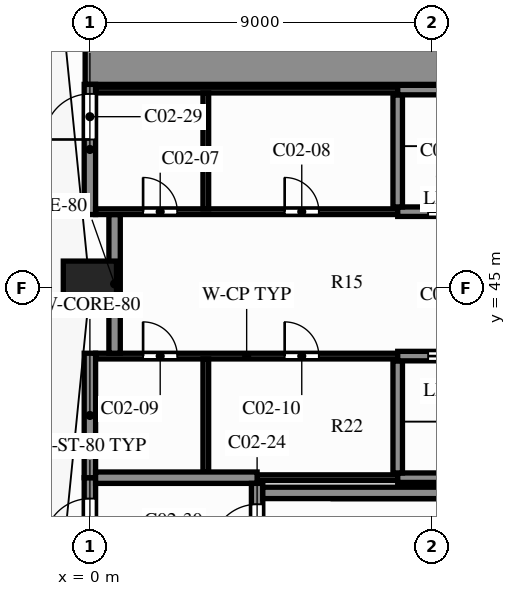
"""IFC4 building model, lengths in metres.
Left out: names, types, materials, properties, quantities, classifications, styles, units other than length and angle.
Written with IfcOpenShell. Run it as: python <this file> out.ifc"""

import sys

from ifc_helpers import new_model, si_unit, direction, frame, frame_2d, origin, origin_2d, place, context, subcontext, project, spatial, rectangle, extrude, element, fill, save


model = new_model("IFC4")
c1 = context("Model", 3, precision=1e-05, world=origin(), true_north=direction((0.0, 1.0)))
c2 = subcontext(c1, "Body", "Model", "MODEL_VIEW")
j1 = project(units=[si_unit("LENGTHUNIT", "METRE"), si_unit("PLANEANGLEUNIT", "RADIAN")], contexts=[c1])
p1 = place(None, origin())
s1 = spatial("IfcSite", under=j1, at=p1, CompositionType="ELEMENT")
p2 = place(p1, origin())
s2 = spatial("IfcBuilding", under=s1, at=p2, CompositionType="ELEMENT")
p3 = place(p2, origin())
s3 = spatial("IfcBuildingStorey", under=s2, at=p3, CompositionType="ELEMENT", Elevation=0.0)
p4 = place(p3, frame((0.0, 45.0, 0.0), z_axis=(0.0, 0.0, 1.0), x_axis=(1.0, 0.0, 0.0)))
e1 = element("IfcColumn", 1, at=p4, inside=s3, PredefinedType="COLUMN", context=c2, shape_type="SweptSolid", body=[
    extrude(rectangle(XDim=1.4, YDim=1.4, at=origin_2d()), origin(), (0.0, 0.0, 1.0), 7.5),
])
p5 = place(p3, frame((4.55, 39.6, 0.0), z_axis=(0.0, 0.0, 1.0), x_axis=(1.0, 0.0, 0.0)))
e2 = element("IfcWall", 2, at=p5, inside=s3, PredefinedType="SHEAR", context=c2, shape_type="SweptSolid", body=[
    extrude(rectangle(XDim=7.7, YDim=0.3, at=frame_2d((3.85, 0.0))), origin(), (0.0, 0.0, 1.0), 7.2),
])
p6 = place(p3, frame((4.4, 40.0, 0.0), z_axis=(0.0, 0.0, 1.0), x_axis=(1.0, 0.0, 0.0)))
e3 = element("IfcWall", 3, at=p6, inside=s3, PredefinedType="PARTITIONING", context=c2, shape_type="SweptSolid", body=[
    extrude(rectangle(XDim=3.7, YDim=0.15, at=frame_2d((1.85, 0.0))), origin(), (0.0, 0.0, 1.0), 7.2),
])
p7 = place(p3, frame((8.1, 40.0, 0.0), z_axis=(0.0, 0.0, 1.0), x_axis=(1.0, 0.0, 0.0)))
e4 = element("IfcWall", 4, at=p7, inside=s3, PredefinedType="SHEAR", context=c2, shape_type="SweptSolid", body=[
    extrude(rectangle(XDim=16.075, YDim=0.25, at=frame_2d((8.038, 0.0))), origin(), (0.0, 0.0, 1.0), 7.2),
])
p8 = place(p3, frame((0.15, 40.0, 0.0), z_axis=(0.0, 0.0, 1.0), x_axis=(1.0, 0.0, 0.0)))
e5 = element("IfcWall", 5, at=p8, inside=s3, PredefinedType="SHEAR", context=c2, shape_type="SweptSolid", body=[
    extrude(rectangle(XDim=4.25, YDim=0.3, at=frame_2d((2.125, 0.0))), origin(), (0.0, 0.0, 1.0), 7.2),
])
p9 = place(p3, frame((0.15, 43.2, 0.0), z_axis=(0.0, 0.0, 1.0), x_axis=(1.0, 0.0, 0.0)))
e6 = element("IfcWall", 6, at=p9, inside=s3, PredefinedType="PARTITIONING", context=c2, shape_type="SweptSolid", body=[
    extrude(rectangle(XDim=7.95, YDim=0.15, at=frame_2d((3.975, 0.0))), origin(), (0.0, 0.0, 1.0), 7.2),
])
p10 = place(p9, frame((1.25, 0.0, 0.0)))
e7 = element("IfcOpeningElement", 7, at=p10, cuts=e6, PredefinedType="OPENING", context=c2, shape_type="SweptSolid", body=[
    extrude(rectangle(XDim=0.9, YDim=2.1, at=frame_2d((0.45, 1.05))), frame((0.0, 0.085, 0.0), z_axis=(0.0, -1.0, 0.0), x_axis=(1.0, 0.0, 0.0)), (0.0, 0.0, 1.0), 0.17),
])
p11 = place(p9, frame((4.975, 0.0, 0.0)))
e8 = element("IfcOpeningElement", 8, at=p11, cuts=e6, PredefinedType="OPENING", context=c2, shape_type="SweptSolid", body=[
    extrude(rectangle(XDim=0.9, YDim=2.1, at=frame_2d((0.45, 1.05))), frame((0.0, 0.085, 0.0), z_axis=(0.0, -1.0, 0.0), x_axis=(1.0, 0.0, 0.0)), (0.0, 0.0, 1.0), 0.17),
])
p12 = place(p3, frame((8.1, 43.2, 0.0), z_axis=(0.0, 0.0, 1.0), x_axis=(1.0, 0.0, 0.0)))
e9 = element("IfcWall", 9, at=p12, inside=s3, PredefinedType="SHEAR", context=c2, shape_type="SweptSolid", body=[
    extrude(rectangle(XDim=16.075, YDim=0.25, at=frame_2d((8.038, 0.0))), origin(), (0.0, 0.0, 1.0), 7.2),
])
p13 = place(p12, frame((14.3, 0.0, 0.0)))
e10 = element("IfcOpeningElement", 10, at=p13, cuts=e9, PredefinedType="OPENING", context=c2, shape_type="SweptSolid", body=[
    extrude(rectangle(XDim=1.1, YDim=2.1, at=frame_2d((0.55, 1.05))), frame((0.0, 0.135, 0.0), z_axis=(0.0, -1.0, 0.0), x_axis=(1.0, 0.0, 0.0)), (0.0, 0.0, 1.0), 0.27),
])
p14 = place(p12, frame((0.8, 0.0, 0.0)))
e11 = element("IfcOpeningElement", 11, at=p14, cuts=e9, PredefinedType="OPENING", context=c2, shape_type="SweptSolid", body=[
    extrude(rectangle(XDim=1.1, YDim=2.1, at=frame_2d((0.55, 1.05))), frame((0.0, 0.135, 0.0), z_axis=(0.0, -1.0, 0.0), x_axis=(1.0, 0.0, 0.0)), (0.0, 0.0, 1.0), 0.27),
])
p15 = place(p12, frame((3.5, 0.0, 0.0)))
e12 = element("IfcOpeningElement", 12, at=p15, cuts=e9, PredefinedType="OPENING", context=c2, shape_type="SweptSolid", body=[
    extrude(rectangle(XDim=1.1, YDim=2.1, at=frame_2d((0.55, 1.05))), frame((0.0, 0.135, 0.0), z_axis=(0.0, -1.0, 0.0), x_axis=(1.0, 0.0, 0.0)), (0.0, 0.0, 1.0), 0.27),
])
p16 = place(p12, frame((6.2, 0.0, 0.0)))
e13 = element("IfcOpeningElement", 13, at=p16, cuts=e9, PredefinedType="OPENING", context=c2, shape_type="SweptSolid", body=[
    extrude(rectangle(XDim=1.1, YDim=2.1, at=frame_2d((0.55, 1.05))), frame((0.0, 0.135, 0.0), z_axis=(0.0, -1.0, 0.0), x_axis=(1.0, 0.0, 0.0)), (0.0, 0.0, 1.0), 0.27),
])
p17 = place(p12, frame((8.9, 0.0, 0.0)))
e14 = element("IfcOpeningElement", 14, at=p17, cuts=e9, PredefinedType="OPENING", context=c2, shape_type="SweptSolid", body=[
    extrude(rectangle(XDim=1.1, YDim=2.1, at=frame_2d((0.55, 1.05))), frame((0.0, 0.135, 0.0), z_axis=(0.0, -1.0, 0.0), x_axis=(1.0, 0.0, 0.0)), (0.0, 0.0, 1.0), 0.27),
])
p18 = place(p12, frame((11.6, 0.0, 0.0)))
e15 = element("IfcOpeningElement", 15, at=p18, cuts=e9, PredefinedType="OPENING", context=c2, shape_type="SweptSolid", body=[
    extrude(rectangle(XDim=1.1, YDim=2.1, at=frame_2d((0.55, 1.05))), frame((0.0, 0.135, 0.0), z_axis=(0.0, -1.0, 0.0), x_axis=(1.0, 0.0, 0.0)), (0.0, 0.0, 1.0), 0.27),
])
p19 = place(p3, frame((0.15, 47.0, 0.0), z_axis=(0.0, 0.0, 1.0), x_axis=(1.0, 0.0, 0.0)))
e16 = element("IfcWall", 16, at=p19, inside=s3, PredefinedType="PARTITIONING", context=c2, shape_type="SweptSolid", body=[
    extrude(rectangle(XDim=7.95, YDim=0.15, at=frame_2d((3.975, 0.0))), origin(), (0.0, 0.0, 1.0), 7.2),
])
p20 = place(p19, frame((1.25, 0.0, 0.0)))
e17 = element("IfcOpeningElement", 17, at=p20, cuts=e16, PredefinedType="OPENING", context=c2, shape_type="SweptSolid", body=[
    extrude(rectangle(XDim=0.9, YDim=2.1, at=frame_2d((0.45, 1.05))), frame((0.0, 0.085, 0.0), z_axis=(0.0, -1.0, 0.0), x_axis=(1.0, 0.0, 0.0)), (0.0, 0.0, 1.0), 0.17),
])
p21 = place(p19, frame((4.975, 0.0, 0.0)))
e18 = element("IfcOpeningElement", 18, at=p21, cuts=e16, PredefinedType="OPENING", context=c2, shape_type="SweptSolid", body=[
    extrude(rectangle(XDim=0.9, YDim=2.1, at=frame_2d((0.45, 1.05))), frame((0.0, 0.085, 0.0), z_axis=(0.0, -1.0, 0.0), x_axis=(1.0, 0.0, 0.0)), (0.0, 0.0, 1.0), 0.17),
])
p22 = place(p3, frame((8.1, 47.0, 0.0), z_axis=(0.0, 0.0, 1.0), x_axis=(1.0, 0.0, 0.0)))
e19 = element("IfcWall", 19, at=p22, inside=s3, PredefinedType="SHEAR", context=c2, shape_type="SweptSolid", body=[
    extrude(rectangle(XDim=13.5, YDim=0.25, at=frame_2d((6.75, 0.0))), origin(), (0.0, 0.0, 1.0), 7.2),
])
p23 = place(p22, frame((0.8, 0.0, 0.0)))
e20 = element("IfcOpeningElement", 20, at=p23, cuts=e19, PredefinedType="OPENING", context=c2, shape_type="SweptSolid", body=[
    extrude(rectangle(XDim=1.1, YDim=2.1, at=frame_2d((0.55, 1.05))), frame((0.0, 0.135, 0.0), z_axis=(0.0, -1.0, 0.0), x_axis=(1.0, 0.0, 0.0)), (0.0, 0.0, 1.0), 0.27),
])
p24 = place(p22, frame((3.5, 0.0, 0.0)))
e21 = element("IfcOpeningElement", 21, at=p24, cuts=e19, PredefinedType="OPENING", context=c2, shape_type="SweptSolid", body=[
    extrude(rectangle(XDim=1.1, YDim=2.1, at=frame_2d((0.55, 1.05))), frame((0.0, 0.135, 0.0), z_axis=(0.0, -1.0, 0.0), x_axis=(1.0, 0.0, 0.0)), (0.0, 0.0, 1.0), 0.27),
])
p25 = place(p22, frame((6.2, 0.0, 0.0)))
e22 = element("IfcOpeningElement", 22, at=p25, cuts=e19, PredefinedType="OPENING", context=c2, shape_type="SweptSolid", body=[
    extrude(rectangle(XDim=1.1, YDim=2.1, at=frame_2d((0.55, 1.05))), frame((0.0, 0.135, 0.0), z_axis=(0.0, -1.0, 0.0), x_axis=(1.0, 0.0, 0.0)), (0.0, 0.0, 1.0), 0.27),
])
p26 = place(p22, frame((8.9, 0.0, 0.0)))
e23 = element("IfcOpeningElement", 23, at=p26, cuts=e19, PredefinedType="OPENING", context=c2, shape_type="SweptSolid", body=[
    extrude(rectangle(XDim=1.1, YDim=2.1, at=frame_2d((0.55, 1.05))), frame((0.0, 0.135, 0.0), z_axis=(0.0, -1.0, 0.0), x_axis=(1.0, 0.0, 0.0)), (0.0, 0.0, 1.0), 0.27),
])
p27 = place(p22, frame((11.6, 0.0, 0.0)))
e24 = element("IfcOpeningElement", 24, at=p27, cuts=e19, PredefinedType="OPENING", context=c2, shape_type="SweptSolid", body=[
    extrude(rectangle(XDim=1.1, YDim=2.1, at=frame_2d((0.55, 1.05))), frame((0.0, 0.135, 0.0), z_axis=(0.0, -1.0, 0.0), x_axis=(1.0, 0.0, 0.0)), (0.0, 0.0, 1.0), 0.27),
])
p28 = place(p3, frame((0.15, 50.2, 0.0), z_axis=(0.0, 0.0, 1.0), x_axis=(1.0, 0.0, 0.0)))
e25 = element("IfcWall", 25, at=p28, inside=s3, PredefinedType="PARTITIONING", context=c2, shape_type="SweptSolid", body=[
    extrude(rectangle(XDim=7.95, YDim=0.15, at=frame_2d((3.975, 0.0))), origin(), (0.0, 0.0, 1.0), 7.2),
])
p29 = place(p3, frame((8.1, 50.2, 0.0), z_axis=(0.0, 0.0, 1.0), x_axis=(1.0, 0.0, 0.0)))
e26 = element("IfcWall", 26, at=p29, inside=s3, PredefinedType="SHEAR", context=c2, shape_type="SweptSolid", body=[
    extrude(rectangle(XDim=13.375, YDim=0.25, at=frame_2d((6.688, 0.0))), origin(), (0.0, 0.0, 1.0), 7.2),
])
p30 = place(p3, frame((-0.125, 51.0, 0.0), z_axis=(0.0, 0.0, 1.0), x_axis=(1.0, 0.0, 0.0)))
e27 = element("IfcWall", 27, at=p30, inside=s3, PredefinedType="SHEAR", context=c2, shape_type="SweptSolid", body=[
    extrude(rectangle(XDim=21.625, YDim=1.3, at=frame_2d((10.812, 0.0))), origin(), (0.0, 0.0, 1.0), 7.2),
])
p31 = place(p3, frame((0.0, 40.0, 0.0), z_axis=(0.0, 0.0, 1.0), x_axis=(0.0, 1.0, 0.0)))
e28 = element("IfcWall", 28, at=p31, inside=s3, PredefinedType="SHEAR", context=c2, shape_type="SweptSolid", body=[
    extrude(rectangle(XDim=3.275, YDim=0.3, at=frame_2d((1.637, 0.0))), origin(), (0.0, 0.0, 1.0), 7.2),
])
p32 = place(p3, frame((0.0, 46.925, 0.0), z_axis=(0.0, 0.0, 1.0), x_axis=(0.0, 1.0, 0.0)))
e29 = element("IfcWall", 29, at=p32, inside=s3, PredefinedType="SHEAR", context=c2, shape_type="SweptSolid", body=[
    extrude(rectangle(XDim=3.425, YDim=0.3, at=frame_2d((1.712, 0.0))), origin(), (0.0, 0.0, 1.0), 7.2),
])
p33 = place(p32, frame((1.975, 0.0, 0.0)))
e30 = element("IfcOpeningElement", 30, at=p33, cuts=e29, PredefinedType="OPENING", context=c2, shape_type="SweptSolid", body=[
    extrude(rectangle(XDim=1.2, YDim=2.1, at=frame_2d((0.6, 1.05))), frame((0.0, 0.16, 0.0), z_axis=(0.0, -1.0, 0.0), x_axis=(1.0, 0.0, 0.0)), (0.0, 0.0, 1.0), 0.32),
])
p34 = place(p3, frame((0.0, 35.85, 0.0), z_axis=(0.0, 0.0, 1.0), x_axis=(0.0, 1.0, 0.0)))
e31 = element("IfcWall", 31, at=p34, inside=s3, PredefinedType="SHEAR", context=c2, shape_type="SweptSolid", body=[
    extrude(rectangle(XDim=4.15, YDim=0.3, at=frame_2d((2.075, 0.0))), origin(), (0.0, 0.0, 1.0), 7.2),
])
p35 = place(p34, frame((2.4, 0.0, 0.0)))
e32 = element("IfcOpeningElement", 32, at=p35, cuts=e31, PredefinedType="OPENING", context=c2, shape_type="SweptSolid", body=[
    extrude(rectangle(XDim=1.2, YDim=2.2, at=frame_2d((0.6, 1.1))), frame((0.0, 0.16, 0.0), z_axis=(0.0, -1.0, 0.0), x_axis=(1.0, 0.0, 0.0)), (0.0, 0.0, 1.0), 0.32),
])
p36 = place(p3, frame((0.65, 43.275, 0.0), z_axis=(0.0, 0.0, 1.0), x_axis=(0.0, 1.0, 0.0)))
e33 = element("IfcWall", 33, at=p36, inside=s3, PredefinedType="SHEAR", context=c2, shape_type="SweptSolid", body=[
    extrude(rectangle(XDim=3.65, YDim=0.3, at=frame_2d((1.825, 0.0))), origin(), (0.0, 0.0, 1.0), 7.2),
])
p37 = place(p3, frame((3.05, 40.15, 0.0), z_axis=(0.0, 0.0, 1.0), x_axis=(0.0, 1.0, 0.0)))
e34 = element("IfcWall", 34, at=p37, inside=s3, PredefinedType="PARTITIONING", context=c2, shape_type="SweptSolid", body=[
    extrude(rectangle(XDim=2.975, YDim=0.15, at=frame_2d((1.488, 0.0))), origin(), (0.0, 0.0, 1.0), 7.2),
])
p38 = place(p3, frame((3.05, 47.075, 0.0), z_axis=(0.0, 0.0, 1.0), x_axis=(0.0, 1.0, 0.0)))
e35 = element("IfcWall", 35, at=p38, inside=s3, PredefinedType="PARTITIONING", context=c2, shape_type="SweptSolid", body=[
    extrude(rectangle(XDim=3.05, YDim=0.15, at=frame_2d((1.525, 0.0))), origin(), (0.0, 0.0, 1.0), 7.2),
])
p39 = place(p3, frame((4.4, 36.15, 0.0), z_axis=(0.0, 0.0, 1.0), x_axis=(0.0, 1.0, 0.0)))
e36 = element("IfcWall", 36, at=p39, inside=s3, PredefinedType="SHEAR", context=c2, shape_type="SweptSolid", body=[
    extrude(rectangle(XDim=3.7, YDim=0.3, at=frame_2d((1.85, 0.0))), origin(), (0.0, 0.0, 1.0), 7.2),
])
p40 = place(p39, frame((1.95, 0.0, 0.0)))
e37 = element("IfcOpeningElement", 37, at=p40, cuts=e36, PredefinedType="OPENING", context=c2, shape_type="SweptSolid", body=[
    extrude(rectangle(XDim=1.2, YDim=2.2, at=frame_2d((0.6, 1.1))), frame((0.0, 0.16, 0.0), z_axis=(0.0, -1.0, 0.0), x_axis=(1.0, 0.0, 0.0)), (0.0, 0.0, 1.0), 0.32),
])
for number, where, z_axis, x_axis in (
    (38, (8.1, 40.125, 0.0), (0.0, 0.0, 1.0), (0.0, 1.0, 0.0)),
    (39, (8.1, 47.125, 0.0), (0.0, 0.0, 1.0), (0.0, 1.0, 0.0)),
):
    element("IfcWall", number, at=place(p3, frame(where, z_axis=z_axis, x_axis=x_axis)), inside=s3, PredefinedType="SHEAR", context=c2, shape_type="SweptSolid", body=[
        extrude(rectangle(XDim=2.95, YDim=0.25, at=frame_2d((1.475, 0.0))), origin(), (0.0, 0.0, 1.0), 7.2),
    ])
p41 = place(p20, origin())
e40 = element("IfcDoor", 40, at=p41, inside=s3, OperationType="SINGLE_SWING_RIGHT", PredefinedType="DOOR", context=c2, shape_type="SweptSolid", body=[
    extrude(rectangle(XDim=0.9, YDim=2.1, at=frame_2d((0.45, 1.05))), frame((0.0, 0.025, 0.0), z_axis=(0.0, -1.0, 0.0), x_axis=(1.0, 0.0, 0.0)), (0.0, 0.0, 1.0), 0.05),
])
fill(e17, e40)
p42 = place(p21, origin())
e41 = element("IfcDoor", 41, at=p42, inside=s3, OperationType="SINGLE_SWING_LEFT", PredefinedType="DOOR", context=c2, shape_type="SweptSolid", body=[
    extrude(rectangle(XDim=0.9, YDim=2.1, at=frame_2d((0.45, 1.05))), frame((0.0, 0.025, 0.0), z_axis=(0.0, -1.0, 0.0), x_axis=(1.0, 0.0, 0.0)), (0.0, 0.0, 1.0), 0.05),
])
fill(e18, e41)
p43 = place(p10, origin())
e42 = element("IfcDoor", 42, at=p43, inside=s3, OperationType="SINGLE_SWING_LEFT", PredefinedType="DOOR", context=c2, shape_type="SweptSolid", body=[
    extrude(rectangle(XDim=0.9, YDim=2.1, at=frame_2d((0.45, 1.05))), frame((0.0, 0.025, 0.0), z_axis=(0.0, -1.0, 0.0), x_axis=(1.0, 0.0, 0.0)), (0.0, 0.0, 1.0), 0.05),
])
fill(e7, e42)
p44 = place(p11, origin())
e43 = element("IfcDoor", 43, at=p44, inside=s3, OperationType="SINGLE_SWING_RIGHT", PredefinedType="DOOR", context=c2, shape_type="SweptSolid", body=[
    extrude(rectangle(XDim=0.9, YDim=2.1, at=frame_2d((0.45, 1.05))), frame((0.0, 0.025, 0.0), z_axis=(0.0, -1.0, 0.0), x_axis=(1.0, 0.0, 0.0)), (0.0, 0.0, 1.0), 0.05),
])
fill(e8, e43)
p45 = place(p40, origin())
e44 = element("IfcDoor", 44, at=p45, inside=s3, OperationType="SINGLE_SWING_LEFT", PredefinedType="DOOR", context=c2, shape_type="SweptSolid", body=[
    extrude(rectangle(XDim=1.2, YDim=2.2, at=frame_2d((0.6, 1.1))), frame((0.0, 0.025, 0.0), z_axis=(0.0, -1.0, 0.0), x_axis=(1.0, 0.0, 0.0)), (0.0, 0.0, 1.0), 0.05),
])
fill(e37, e44)
p46 = place(p33, origin())
e45 = element("IfcDoor", 45, at=p46, inside=s3, OperationType="SINGLE_SWING_LEFT", PredefinedType="DOOR", context=c2, shape_type="SweptSolid", body=[
    extrude(rectangle(XDim=1.2, YDim=2.1, at=frame_2d((0.6, 1.05))), frame((0.0, 0.025, 0.0), z_axis=(0.0, -1.0, 0.0), x_axis=(1.0, 0.0, 0.0)), (0.0, 0.0, 1.0), 0.05),
])
fill(e30, e45)
p47 = place(p35, origin())
e46 = element("IfcDoor", 46, at=p47, inside=s3, OperationType="SINGLE_SWING_RIGHT", PredefinedType="DOOR", context=c2, shape_type="SweptSolid", body=[
    extrude(rectangle(XDim=1.2, YDim=2.2, at=frame_2d((0.6, 1.1))), frame((0.0, 0.025, 0.0), z_axis=(0.0, -1.0, 0.0), x_axis=(1.0, 0.0, 0.0)), (0.0, 0.0, 1.0), 0.05),
])
fill(e32, e46)
p48 = place(p14, origin())
e47 = element("IfcDoor", 47, at=p48, inside=s3, OperationType="DOUBLE_DOOR_SLIDING", PredefinedType="DOOR", context=c2, shape_type="SweptSolid", body=[
    extrude(rectangle(XDim=1.1, YDim=2.1, at=frame_2d((0.55, 1.05))), frame((0.0, 0.025, 0.0), z_axis=(0.0, -1.0, 0.0), x_axis=(1.0, 0.0, 0.0)), (0.0, 0.0, 1.0), 0.05),
])
fill(e11, e47)
p49 = place(p23, origin())
e48 = element("IfcDoor", 48, at=p49, inside=s3, OperationType="DOUBLE_DOOR_SLIDING", PredefinedType="DOOR", context=c2, shape_type="SweptSolid", body=[
    extrude(rectangle(XDim=1.1, YDim=2.1, at=frame_2d((0.55, 1.05))), frame((0.0, 0.025, 0.0), z_axis=(0.0, -1.0, 0.0), x_axis=(1.0, 0.0, 0.0)), (0.0, 0.0, 1.0), 0.05),
])
fill(e20, e48)
save(model, sys.argv[1])
